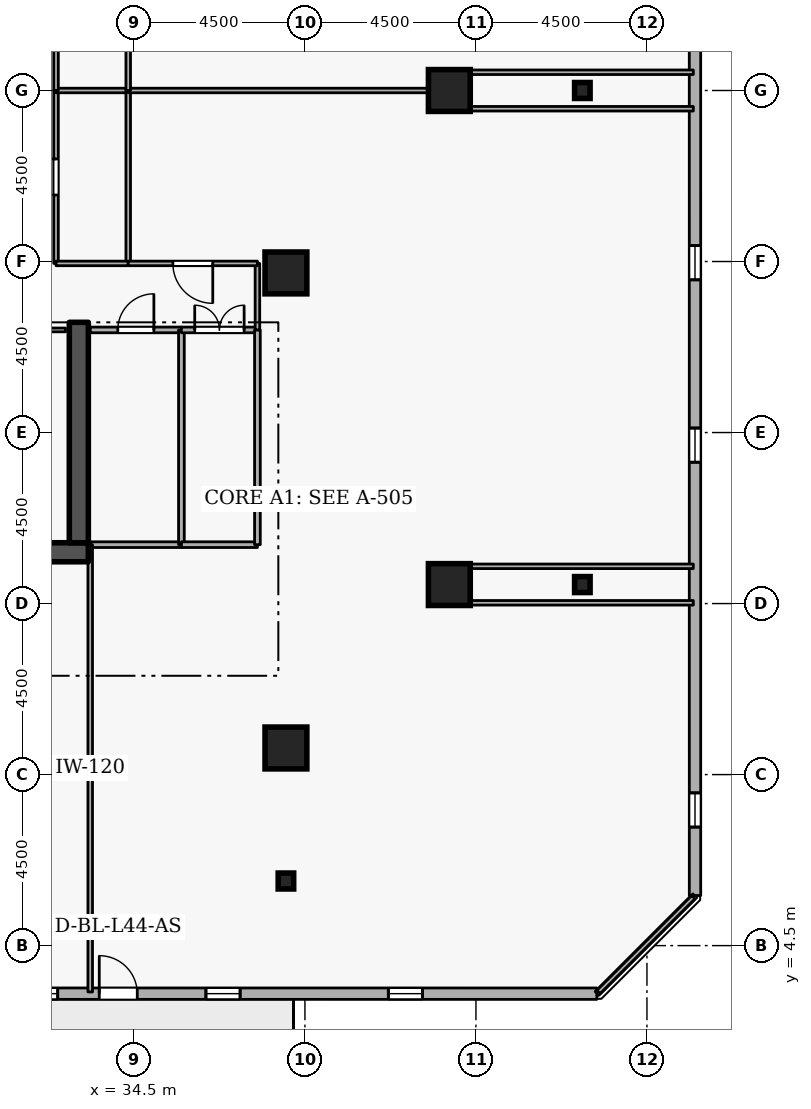
"""IFC4 building model, lengths in metres.
Left out: names, types, materials, properties, quantities, classifications, styles, units other than length and angle.
Written with IfcOpenShell. Run it as: python <this file> out.ifc"""

import sys

from ifc_helpers import new_model, si_unit, direction, frame, frame_2d, origin, origin_2d, place, context, subcontext, project, spatial, rectangle, i_section, extrude, element, fill, save


model = new_model("IFC4")
c1 = context("Model", 3, precision=1e-05, world=origin(), true_north=direction((0.0, 1.0)))
c2 = subcontext(c1, "Body", "Model", "MODEL_VIEW")
j1 = project(units=[si_unit("LENGTHUNIT", "METRE"), si_unit("PLANEANGLEUNIT", "RADIAN")], contexts=[c1])
p1 = place(None, origin())
s1 = spatial("IfcSite", under=j1, at=p1, CompositionType="ELEMENT")
p2 = place(p1, origin())
s2 = spatial("IfcBuilding", under=s1, at=p2, CompositionType="ELEMENT")
p3 = place(p2, frame((0.0, 0.0, 167.1)))
s3 = spatial("IfcBuildingStorey", under=s2, at=p3, CompositionType="ELEMENT", Elevation=167.1)
p4 = place(p3, frame((17.7, 14.85, 0.0), z_axis=(0.0, 0.0, 1.0), x_axis=(1.0, 0.0, 0.0)))
e1 = element("IfcWall", 1, at=p4, inside=s3, PredefinedType="SHEAR", context=c2, shape_type="SweptSolid", body=[
    extrude(rectangle(XDim=15.6, YDim=0.5, at=frame_2d((7.8, 0.0))), origin(), (0.0, 0.0, 1.0), 3.6),
])
p5 = place(p3, frame((33.05, 15.1, 0.0), z_axis=(0.0, 0.0, 1.0), x_axis=(0.0, 1.0, 0.0)))
e2 = element("IfcWall", 2, at=p5, inside=s3, PredefinedType="SHEAR", context=c2, shape_type="SweptSolid", body=[
    extrude(rectangle(XDim=5.8, YDim=0.5, at=frame_2d((2.9, 0.0))), origin(), (0.0, 0.0, 1.0), 3.6),
])
for number, where, z_axis, x_axis in (
    (3, (38.5, 9.7, 0.0), (0.0, 0.0, 1.0), (1.0, 0.0, 0.0)),
    (4, (42.8, 14.0, 0.0), (0.0, 0.0, 1.0), (1.0, 0.0, 0.0)),
    (5, (42.8, 27.0, 0.0), (0.0, 0.0, 1.0), (1.0, 0.0, 0.0)),
    (6, (38.5, 22.2, 0.0), (0.0, 0.0, 1.0), (1.0, 0.0, 0.0)),
):
    element("IfcColumn", number, at=place(p3, frame(where, z_axis=z_axis, x_axis=x_axis)), inside=s3, PredefinedType="COLUMN", context=c2, shape_type="SweptSolid", body=[
        extrude(rectangle(XDim=1.1, YDim=1.1, at=origin_2d()), origin(), (0.0, 0.0, 1.0), 3.6),
    ])
for number, where, z_axis, x_axis in (
    (7, (38.5, 6.2, 0.0), (0.0, 0.0, 1.0), (1.0, 0.0, 0.0)),
    (8, (46.3, 14.0, 0.0), (0.0, 0.0, 1.0), (1.0, 0.0, 0.0)),
    (9, (46.3, 27.0, 0.0), (0.0, 0.0, 1.0), (1.0, 0.0, 0.0)),
):
    element("IfcColumn", number, at=place(p3, frame(where, z_axis=z_axis, x_axis=x_axis)), inside=s3, PredefinedType="COLUMN", context=c2, shape_type="SweptSolid", body=[
        extrude(i_section(OverallWidth=0.407, OverallDepth=0.419, WebThickness=0.031, FlangeThickness=0.049, FilletRadius=0.015, at=origin_2d()), origin(), (0.0, 0.0, 1.0), 3.6),
    ])
p6 = place(p3, frame((10.594, 3.236, 0.0), z_axis=(0.0, 0.0, 1.0), x_axis=(0.999999999634, -2.7061402e-05, 0.0)))
e10 = element("IfcWall", 10, at=p6, inside=s3, PredefinedType="STANDARD", context=c2, shape_type="SweptSolid", body=[
    extrude(rectangle(XDim=36.087, YDim=0.3, at=frame_2d((18.043, 0.0))), origin(), (0.0, 0.0, 1.0), 2.7),
])
p7 = place(p6, frame((22.993, 0.0, 0.0)))
e11 = element("IfcOpeningElement", 11, at=p7, cuts=e10, PredefinedType="OPENING", context=c2, shape_type="SweptSolid", body=[
    extrude(rectangle(XDim=1.0, YDim=2.08, at=frame_2d((0.5, 1.04))), frame((0.0, 0.16, 0.0), z_axis=(0.0, -1.0, 0.0), x_axis=(1.0, 0.0, 0.0)), (0.0, 0.0, 1.0), 0.32),
])
p8 = place(p6, frame((1.8, 0.0, 0.72)))
e12 = element("IfcOpeningElement", 12, at=p8, cuts=e10, PredefinedType="OPENING", context=c2, shape_type="SweptSolid", body=[
    extrude(rectangle(XDim=0.9, YDim=1.75, at=frame_2d((0.45, 0.875))), frame((0.0, 0.16, 0.0), z_axis=(0.0, -1.0, 0.0), x_axis=(1.0, 0.0, 0.0)), (0.0, 0.0, 1.0), 0.32),
])
p9 = place(p6, frame((6.6, 0.0, 0.72)))
e13 = element("IfcOpeningElement", 13, at=p9, cuts=e10, PredefinedType="OPENING", context=c2, shape_type="SweptSolid", body=[
    extrude(rectangle(XDim=0.9, YDim=1.75, at=frame_2d((0.45, 0.875))), frame((0.0, 0.16, 0.0), z_axis=(0.0, -1.0, 0.0), x_axis=(1.0, 0.0, 0.0)), (0.0, 0.0, 1.0), 0.32),
])
p10 = place(p6, frame((11.4, 0.0, 0.72)))
e14 = element("IfcOpeningElement", 14, at=p10, cuts=e10, PredefinedType="OPENING", context=c2, shape_type="SweptSolid", body=[
    extrude(rectangle(XDim=0.9, YDim=1.75, at=frame_2d((0.45, 0.875))), frame((0.0, 0.16, 0.0), z_axis=(0.0, -1.0, 0.0), x_axis=(1.0, 0.0, 0.0)), (0.0, 0.0, 1.0), 0.32),
])
p11 = place(p6, frame((16.2, 0.0, 0.72)))
e15 = element("IfcOpeningElement", 15, at=p11, cuts=e10, PredefinedType="OPENING", context=c2, shape_type="SweptSolid", body=[
    extrude(rectangle(XDim=0.9, YDim=1.75, at=frame_2d((0.45, 0.875))), frame((0.0, 0.16, 0.0), z_axis=(0.0, -1.0, 0.0), x_axis=(1.0, 0.0, 0.0)), (0.0, 0.0, 1.0), 0.32),
])
p12 = place(p6, frame((21.0, 0.0, 0.72)))
e16 = element("IfcOpeningElement", 16, at=p12, cuts=e10, PredefinedType="OPENING", context=c2, shape_type="SweptSolid", body=[
    extrude(rectangle(XDim=0.9, YDim=1.75, at=frame_2d((0.45, 0.875))), frame((0.0, 0.16, 0.0), z_axis=(0.0, -1.0, 0.0), x_axis=(1.0, 0.0, 0.0)), (0.0, 0.0, 1.0), 0.32),
])
p13 = place(p6, frame((25.8, 0.0, 0.72)))
e17 = element("IfcOpeningElement", 17, at=p13, cuts=e10, PredefinedType="OPENING", context=c2, shape_type="SweptSolid", body=[
    extrude(rectangle(XDim=0.9, YDim=1.75, at=frame_2d((0.45, 0.875))), frame((0.0, 0.16, 0.0), z_axis=(0.0, -1.0, 0.0), x_axis=(1.0, 0.0, 0.0)), (0.0, 0.0, 1.0), 0.32),
])
p14 = place(p6, frame((30.6, 0.0, 0.72)))
e18 = element("IfcOpeningElement", 18, at=p14, cuts=e10, PredefinedType="OPENING", context=c2, shape_type="SweptSolid", body=[
    extrude(rectangle(XDim=0.9, YDim=1.75, at=frame_2d((0.45, 0.875))), frame((0.0, 0.16, 0.0), z_axis=(0.0, -1.0, 0.0), x_axis=(1.0, 0.0, 0.0)), (0.0, 0.0, 1.0), 0.32),
])
p15 = place(p3, frame((49.265, 5.819, 0.0), z_axis=(0.0, 0.0, 1.0), x_axis=(-2.7061402e-05, 0.999999999634, 0.0)))
e19 = element("IfcWall", 19, at=p15, inside=s3, PredefinedType="STANDARD", context=c2, shape_type="SweptSolid", body=[
    extrude(rectangle(XDim=36.087, YDim=0.3, at=frame_2d((18.043, 0.0))), origin(), (0.0, 0.0, 1.0), 2.7),
])
p16 = place(p15, frame((1.8, 0.0, 0.72)))
e20 = element("IfcOpeningElement", 20, at=p16, cuts=e19, PredefinedType="OPENING", context=c2, shape_type="SweptSolid", body=[
    extrude(rectangle(XDim=0.9, YDim=1.75, at=frame_2d((0.45, 0.875))), frame((0.0, 0.16, 0.0), z_axis=(0.0, -1.0, 0.0), x_axis=(1.0, 0.0, 0.0)), (0.0, 0.0, 1.0), 0.32),
])
p17 = place(p15, frame((11.4, 0.0, 0.72)))
e21 = element("IfcOpeningElement", 21, at=p17, cuts=e19, PredefinedType="OPENING", context=c2, shape_type="SweptSolid", body=[
    extrude(rectangle(XDim=0.9, YDim=1.75, at=frame_2d((0.45, 0.875))), frame((0.0, 0.16, 0.0), z_axis=(0.0, -1.0, 0.0), x_axis=(1.0, 0.0, 0.0)), (0.0, 0.0, 1.0), 0.32),
])
p18 = place(p15, frame((16.2, 0.0, 0.72)))
e22 = element("IfcOpeningElement", 22, at=p18, cuts=e19, PredefinedType="OPENING", context=c2, shape_type="SweptSolid", body=[
    extrude(rectangle(XDim=0.9, YDim=1.75, at=frame_2d((0.45, 0.875))), frame((0.0, 0.16, 0.0), z_axis=(0.0, -1.0, 0.0), x_axis=(1.0, 0.0, 0.0)), (0.0, 0.0, 1.0), 0.32),
])
p19 = place(p15, frame((25.8, 0.0, 0.72)))
e23 = element("IfcOpeningElement", 23, at=p19, cuts=e19, PredefinedType="OPENING", context=c2, shape_type="SweptSolid", body=[
    extrude(rectangle(XDim=0.9, YDim=1.75, at=frame_2d((0.45, 0.875))), frame((0.0, 0.16, 0.0), z_axis=(0.0, -1.0, 0.0), x_axis=(1.0, 0.0, 0.0)), (0.0, 0.0, 1.0), 0.32),
])
p20 = place(p15, frame((30.6, 0.0, 0.72)))
e24 = element("IfcOpeningElement", 24, at=p20, cuts=e19, PredefinedType="OPENING", context=c2, shape_type="SweptSolid", body=[
    extrude(rectangle(XDim=0.9, YDim=1.75, at=frame_2d((0.45, 0.875))), frame((0.0, 0.16, 0.0), z_axis=(0.0, -1.0, 0.0), x_axis=(1.0, 0.0, 0.0)), (0.0, 0.0, 1.0), 0.32),
])
p21 = place(p3, frame((30.55, 20.7, 0.0), z_axis=(0.0, 0.0, 1.0), x_axis=(1.0, 0.0, 0.0)))
e25 = element("IfcWall", 25, at=p21, inside=s3, PredefinedType="PARTITIONING", context=c2, shape_type="SweptSolid", body=[
    extrude(rectangle(XDim=2.15, YDim=0.1, at=frame_2d((1.075, 0.0))), origin(), (0.0, 0.0, 1.0), 3.34),
])
p22 = place(p21, frame((0.6, 0.0, 0.0)))
e26 = element("IfcOpeningElement", 26, at=p22, cuts=e25, PredefinedType="OPENING", context=c2, shape_type="SweptSolid", body=[
    extrude(rectangle(XDim=0.95, YDim=2.1, at=frame_2d((0.475, 1.05))), frame((0.0, 0.06, 0.0), z_axis=(0.0, -1.0, 0.0), x_axis=(1.0, 0.0, 0.0)), (0.0, 0.0, 1.0), 0.12),
])
p23 = place(p3, frame((35.75, 15.05, 0.0), z_axis=(0.0, 0.0, 1.0), x_axis=(-1.0, 0.0, 0.0)))
e27 = element("IfcWall", 27, at=p23, inside=s3, PredefinedType="PARTITIONING", context=c2, shape_type="SweptSolid", body=[
    extrude(rectangle(XDim=2.4, YDim=0.15, at=frame_2d((1.2, 0.0))), origin(), (0.0, 0.0, 1.0), 3.34),
])
p24 = place(p3, frame((33.35, 20.7, 0.0), z_axis=(0.0, 0.0, 1.0), x_axis=(1.0, 0.0, 0.0)))
e28 = element("IfcWall", 28, at=p24, inside=s3, PredefinedType="PARTITIONING", context=c2, shape_type="SweptSolid", body=[
    extrude(rectangle(XDim=2.4, YDim=0.15, at=frame_2d((1.2, 0.0))), origin(), (0.0, 0.0, 1.0), 3.34),
])
p25 = place(p24, frame((0.725, 0.0, 0.0)))
e29 = element("IfcOpeningElement", 29, at=p25, cuts=e28, PredefinedType="OPENING", context=c2, shape_type="SweptSolid", body=[
    extrude(rectangle(XDim=0.95, YDim=2.1, at=frame_2d((0.475, 1.05))), frame((0.0, 0.085, 0.0), z_axis=(0.0, -1.0, 0.0), x_axis=(1.0, 0.0, 0.0)), (0.0, 0.0, 1.0), 0.17),
])
p26 = place(p3, frame((35.75, 20.7, 0.0), z_axis=(0.0, 0.0, 1.0), x_axis=(0.0, -1.0, 0.0)))
e30 = element("IfcWall", 30, at=p26, inside=s3, PredefinedType="PARTITIONING", context=c2, shape_type="SweptSolid", body=[
    extrude(rectangle(XDim=5.65, YDim=0.15, at=frame_2d((2.825, 0.0))), origin(), (0.0, 0.0, 1.0), 3.34),
])
p27 = place(p3, frame((37.75, 15.05, 0.0), z_axis=(0.0, 0.0, 1.0), x_axis=(-1.0, 0.0, 0.0)))
e31 = element("IfcWall", 31, at=p27, inside=s3, PredefinedType="PARTITIONING", context=c2, shape_type="SweptSolid", body=[
    extrude(rectangle(XDim=2.0, YDim=0.15, at=frame_2d((1.0, 0.0))), origin(), (0.0, 0.0, 1.0), 3.34),
])
p28 = place(p3, frame((35.75, 20.7, 0.0), z_axis=(0.0, 0.0, 1.0), x_axis=(1.0, 0.0, 0.0)))
e32 = element("IfcWall", 32, at=p28, inside=s3, PredefinedType="PARTITIONING", context=c2, shape_type="SweptSolid", body=[
    extrude(rectangle(XDim=2.0, YDim=0.15, at=frame_2d((1.0, 0.0))), origin(), (0.0, 0.0, 1.0), 3.34),
])
p29 = place(p28, frame((0.35, 0.0, 0.0)))
e33 = element("IfcOpeningElement", 33, at=p29, cuts=e32, PredefinedType="OPENING", context=c2, shape_type="SweptSolid", body=[
    extrude(rectangle(XDim=1.3, YDim=2.12, at=frame_2d((0.65, 1.06))), frame((0.0, 0.085, 0.0), z_axis=(0.0, -1.0, 0.0), x_axis=(1.0, 0.0, 0.0)), (0.0, 0.0, 1.0), 0.17),
])
p30 = place(p3, frame((37.75, 20.7, 0.0), z_axis=(0.0, 0.0, 1.0), x_axis=(0.0, -1.0, 0.0)))
e34 = element("IfcWall", 34, at=p30, inside=s3, PredefinedType="PARTITIONING", context=c2, shape_type="SweptSolid", body=[
    extrude(rectangle(XDim=5.65, YDim=0.15, at=frame_2d((2.825, 0.0))), origin(), (0.0, 0.0, 1.0), 3.34),
])
p31 = place(p3, frame((32.45, 22.45, 0.0), z_axis=(0.0, 0.0, 1.0), x_axis=(0.0, 1.0, 0.0)))
e35 = element("IfcWall", 35, at=p31, inside=s3, PredefinedType="PARTITIONING", context=c2, shape_type="SweptSolid", body=[
    extrude(rectangle(XDim=4.55, YDim=0.12, at=frame_2d((2.275, 0.0))), origin(), (0.0, 0.0, 1.0), 3.34),
])
p32 = place(p31, frame((1.8, 0.0, 0.0)))
e36 = element("IfcOpeningElement", 36, at=p32, cuts=e35, PredefinedType="OPENING", context=c2, shape_type="SweptSolid", body=[
    extrude(rectangle(XDim=0.95, YDim=2.1, at=frame_2d((0.475, 1.05))), frame((0.0, 0.07, 0.0), z_axis=(0.0, -1.0, 0.0), x_axis=(1.0, 0.0, 0.0)), (0.0, 0.0, 1.0), 0.14),
])
p33 = place(p3, frame((32.45, 27.0, 0.0), z_axis=(0.0, 0.0, 1.0), x_axis=(1.0, 0.0, 0.0)))
e37 = element("IfcWall", 37, at=p33, inside=s3, PredefinedType="PARTITIONING", context=c2, shape_type="SweptSolid", body=[
    extrude(rectangle(XDim=1.9, YDim=0.12, at=frame_2d((0.95, 0.0))), origin(), (0.0, 0.0, 1.0), 3.34),
])
p34 = place(p3, frame((34.35, 27.0, 0.0), z_axis=(0.0, 0.0, 1.0), x_axis=(0.0, -1.0, 0.0)))
e38 = element("IfcWall", 38, at=p34, inside=s3, PredefinedType="PARTITIONING", context=c2, shape_type="SweptSolid", body=[
    extrude(rectangle(XDim=4.55, YDim=0.12, at=frame_2d((2.275, 0.0))), origin(), (0.0, 0.0, 1.0), 3.34),
])
p35 = place(p3, frame((34.35, 22.45, 0.0), z_axis=(0.0, 0.0, 1.0), x_axis=(-1.0, 0.0, 0.0)))
e39 = element("IfcWall", 39, at=p35, inside=s3, PredefinedType="PARTITIONING", context=c2, shape_type="SweptSolid", body=[
    extrude(rectangle(XDim=1.9, YDim=0.12, at=frame_2d((0.95, 0.0))), origin(), (0.0, 0.0, 1.0), 3.34),
])
p36 = place(p3, frame((33.35, 3.28, 0.0), z_axis=(0.0, 0.0, 1.0), x_axis=(0.0, 1.0, 0.0)))
e40 = element("IfcWall", 40, at=p36, inside=s3, PredefinedType="PARTITIONING", context=c2, shape_type="SweptSolid", body=[
    extrude(rectangle(XDim=11.77, YDim=0.12, at=frame_2d((5.885, 0.0))), origin(), (0.0, 0.0, 1.0), 2.545),
])
p37 = place(p3, frame((37.75, 20.7, 0.0), z_axis=(0.0, 0.0, 1.0), x_axis=(0.0, 1.0, 0.0)))
e41 = element("IfcWall", 41, at=p37, inside=s3, PredefinedType="PARTITIONING", context=c2, shape_type="SweptSolid", body=[
    extrude(rectangle(XDim=1.75, YDim=0.12, at=frame_2d((0.875, 0.0))), origin(), (0.0, 0.0, 1.0), 3.34),
])
p38 = place(p3, frame((37.75, 22.45, 0.0), z_axis=(0.0, 0.0, 1.0), x_axis=(-1.0, 0.0, 0.0)))
e42 = element("IfcWall", 42, at=p38, inside=s3, PredefinedType="PARTITIONING", context=c2, shape_type="SweptSolid", body=[
    extrude(rectangle(XDim=3.4, YDim=0.12, at=frame_2d((1.7, 0.0))), origin(), (0.0, 0.0, 1.0), 3.34),
])
p39 = place(p38, frame((1.175, 0.0, 0.0)))
e43 = element("IfcOpeningElement", 43, at=p39, cuts=e42, PredefinedType="OPENING", context=c2, shape_type="SweptSolid", body=[
    extrude(rectangle(XDim=1.05, YDim=2.1, at=frame_2d((0.525, 1.05))), frame((0.0, 0.07, 0.0), z_axis=(0.0, -1.0, 0.0), x_axis=(1.0, 0.0, 0.0)), (0.0, 0.0, 1.0), 0.14),
])
p40 = place(p3, frame((34.35, 27.0, 0.0), z_axis=(0.0, 0.0, 1.0), x_axis=(1.0, 0.0, 0.0)))
e44 = element("IfcWall", 44, at=p40, inside=s3, PredefinedType="PARTITIONING", context=c2, shape_type="SweptSolid", body=[
    extrude(rectangle(XDim=8.45, YDim=0.12, at=frame_2d((4.225, 0.0))), origin(), (0.0, 0.0, 1.0), 2.882),
])
for number, where, z_axis, x_axis in (
    (45, (42.8, 26.52, 0.0), (0.0, 0.0, 1.0), (1.0, 0.0, 0.0)),
    (46, (49.22, 14.48, 0.0), (0.0, 0.0, 1.0), (-1.0, 0.0, 0.0)),
    (47, (42.8, 13.52, 0.0), (0.0, 0.0, 1.0), (1.0, 0.0, 0.0)),
):
    element("IfcWall", number, at=place(p3, frame(where, z_axis=z_axis, x_axis=x_axis)), inside=s3, PredefinedType="PARTITIONING", context=c2, shape_type="SweptSolid", body=[
        extrude(rectangle(XDim=6.42, YDim=0.12, at=frame_2d((3.21, 0.0))), origin(), (0.0, 0.0, 1.0), 3.34),
    ])
p41 = place(p3, frame((49.22, 5.775, 0.0), z_axis=(0.0, 0.0, 1.0), x_axis=(-0.707106781187, -0.707106781187, 0.0)))
e48 = element("IfcWall", 48, at=p41, inside=s3, PredefinedType="PARTITIONING", context=c2, shape_type="SweptSolid", body=[
    extrude(rectangle(XDim=3.528, YDim=0.12, at=frame_2d((1.764, 0.0))), origin(), (0.0, 0.0, 1.0), 3.34),
])
p42 = place(p3, frame((32.45, 27.0, 0.0), z_axis=(0.0, 0.0, 1.0), x_axis=(0.0, 1.0, 0.0)))
e49 = element("IfcWall", 49, at=p42, inside=s3, PredefinedType="PARTITIONING", context=c2, shape_type="SweptSolid", body=[
    extrude(rectangle(XDim=4.55, YDim=0.12, at=frame_2d((2.275, 0.0))), origin(), (0.0, 0.0, 1.0), 3.34),
])
p43 = place(p42, frame((1.8, 0.0, 0.0)))
e50 = element("IfcOpeningElement", 50, at=p43, cuts=e49, PredefinedType="OPENING", context=c2, shape_type="SweptSolid", body=[
    extrude(rectangle(XDim=0.95, YDim=2.1, at=frame_2d((0.475, 1.05))), frame((0.0, 0.07, 0.0), z_axis=(0.0, -1.0, 0.0), x_axis=(1.0, 0.0, 0.0)), (0.0, 0.0, 1.0), 0.14),
])
p44 = place(p3, frame((34.35, 31.55, 0.0), z_axis=(0.0, 0.0, 1.0), x_axis=(0.0, -1.0, 0.0)))
e51 = element("IfcWall", 51, at=p44, inside=s3, PredefinedType="PARTITIONING", context=c2, shape_type="SweptSolid", body=[
    extrude(rectangle(XDim=4.55, YDim=0.12, at=frame_2d((2.275, 0.0))), origin(), (0.0, 0.0, 1.0), 3.34),
])
p45 = place(p3, frame((49.22, 27.48, 0.0), z_axis=(0.0, 0.0, 1.0), x_axis=(-1.0, 0.0, 0.0)))
e52 = element("IfcWall", 52, at=p45, inside=s3, PredefinedType="PARTITIONING", context=c2, shape_type="SweptSolid", body=[
    extrude(rectangle(XDim=6.42, YDim=0.12, at=frame_2d((3.21, 0.0))), origin(), (0.0, 0.0, 1.0), 3.34),
])
p46 = place(p7, origin())
e53 = element("IfcDoor", 53, at=p46, inside=s3, OperationType="SINGLE_SWING_LEFT", PredefinedType="DOOR", context=c2, shape_type="SweptSolid", body=[
    extrude(rectangle(XDim=1.0, YDim=2.08, at=frame_2d((0.5, 1.04))), frame((0.0, 0.025, 0.0), z_axis=(0.0, -1.0, 0.0), x_axis=(1.0, 0.0, 0.0)), (0.0, 0.0, 1.0), 0.05),
])
fill(e11, e53)
p47 = place(p12, origin())
e54 = element("IfcWindow", 54, at=p47, inside=s3, PartitioningType="SINGLE_PANEL", PredefinedType="WINDOW", context=c2, shape_type="SweptSolid", body=[
    extrude(rectangle(XDim=0.9, YDim=1.75, at=frame_2d((0.45, 0.875))), frame((0.0, 0.03, 0.0), z_axis=(0.0, -1.0, 0.0), x_axis=(1.0, 0.0, 0.0)), (0.0, 0.0, 1.0), 0.06),
])
fill(e16, e54)
p48 = place(p13, origin())
e55 = element("IfcWindow", 55, at=p48, inside=s3, PartitioningType="SINGLE_PANEL", PredefinedType="WINDOW", context=c2, shape_type="SweptSolid", body=[
    extrude(rectangle(XDim=0.9, YDim=1.75, at=frame_2d((0.45, 0.875))), frame((0.0, 0.03, 0.0), z_axis=(0.0, -1.0, 0.0), x_axis=(1.0, 0.0, 0.0)), (0.0, 0.0, 1.0), 0.06),
])
fill(e17, e55)
p49 = place(p14, origin())
e56 = element("IfcWindow", 56, at=p49, inside=s3, PartitioningType="SINGLE_PANEL", PredefinedType="WINDOW", context=c2, shape_type="SweptSolid", body=[
    extrude(rectangle(XDim=0.9, YDim=1.75, at=frame_2d((0.45, 0.875))), frame((0.0, 0.03, 0.0), z_axis=(0.0, -1.0, 0.0), x_axis=(1.0, 0.0, 0.0)), (0.0, 0.0, 1.0), 0.06),
])
fill(e18, e56)
p50 = place(p16, origin())
e57 = element("IfcWindow", 57, at=p50, inside=s3, PartitioningType="SINGLE_PANEL", PredefinedType="WINDOW", context=c2, shape_type="SweptSolid", body=[
    extrude(rectangle(XDim=0.9, YDim=1.75, at=frame_2d((0.45, 0.875))), frame((0.0, 0.03, 0.0), z_axis=(0.0, -1.0, 0.0), x_axis=(1.0, 0.0, 0.0)), (0.0, 0.0, 1.0), 0.06),
])
fill(e20, e57)
p51 = place(p17, origin())
e58 = element("IfcWindow", 58, at=p51, inside=s3, PartitioningType="SINGLE_PANEL", PredefinedType="WINDOW", context=c2, shape_type="SweptSolid", body=[
    extrude(rectangle(XDim=0.9, YDim=1.75, at=frame_2d((0.45, 0.875))), frame((0.0, 0.03, 0.0), z_axis=(0.0, -1.0, 0.0), x_axis=(1.0, 0.0, 0.0)), (0.0, 0.0, 1.0), 0.06),
])
fill(e21, e58)
p52 = place(p18, origin())
e59 = element("IfcWindow", 59, at=p52, inside=s3, PartitioningType="SINGLE_PANEL", PredefinedType="WINDOW", context=c2, shape_type="SweptSolid", body=[
    extrude(rectangle(XDim=0.9, YDim=1.75, at=frame_2d((0.45, 0.875))), frame((0.0, 0.03, 0.0), z_axis=(0.0, -1.0, 0.0), x_axis=(1.0, 0.0, 0.0)), (0.0, 0.0, 1.0), 0.06),
])
fill(e22, e59)
p53 = place(p25, origin())
e60 = element("IfcDoor", 60, at=p53, inside=s3, OperationType="SINGLE_SWING_RIGHT", PredefinedType="DOOR", context=c2, shape_type="SweptSolid", body=[
    extrude(rectangle(XDim=0.95, YDim=2.1, at=frame_2d((0.475, 1.05))), frame((0.0, 0.025, 0.0), z_axis=(0.0, -1.0, 0.0), x_axis=(1.0, 0.0, 0.0)), (0.0, 0.0, 1.0), 0.05),
])
fill(e29, e60)
p54 = place(p29, origin())
e61 = element("IfcDoor", 61, at=p54, inside=s3, OperationType="DOUBLE_DOOR_SINGLE_SWING", PredefinedType="DOOR", context=c2, shape_type="SweptSolid", body=[
    extrude(rectangle(XDim=1.3, YDim=2.12, at=frame_2d((0.65, 1.06))), frame((0.0, 0.025, 0.0), z_axis=(0.0, -1.0, 0.0), x_axis=(1.0, 0.0, 0.0)), (0.0, 0.0, 1.0), 0.05),
])
fill(e33, e61)
p55 = place(p32, origin())
e62 = element("IfcDoor", 62, at=p55, inside=s3, OperationType="SINGLE_SWING_RIGHT", PredefinedType="DOOR", context=c2, shape_type="SweptSolid", body=[
    extrude(rectangle(XDim=0.95, YDim=2.1, at=frame_2d((0.475, 1.05))), frame((0.0, 0.025, 0.0), z_axis=(0.0, -1.0, 0.0), x_axis=(1.0, 0.0, 0.0)), (0.0, 0.0, 1.0), 0.05),
])
fill(e36, e62)
p56 = place(p39, origin())
e63 = element("IfcDoor", 63, at=p56, inside=s3, OperationType="SINGLE_SWING_LEFT", PredefinedType="DOOR", context=c2, shape_type="SweptSolid", body=[
    extrude(rectangle(XDim=1.05, YDim=2.1, at=frame_2d((0.525, 1.05))), frame((0.0, 0.025, 0.0), z_axis=(0.0, -1.0, 0.0), x_axis=(1.0, 0.0, 0.0)), (0.0, 0.0, 1.0), 0.05),
])
fill(e43, e63)
save(model, sys.argv[1])
